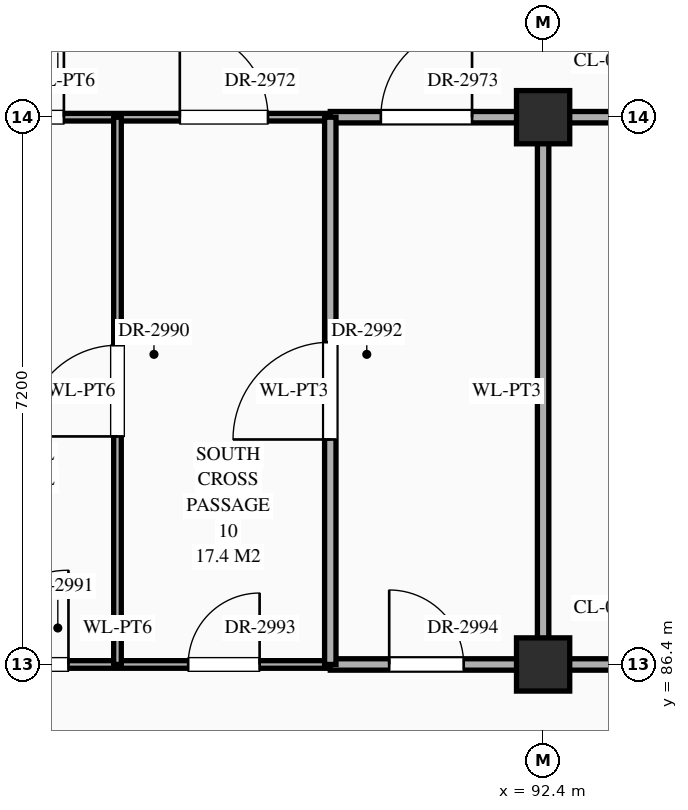
"""IFC4 building model, lengths in metres.
Left out: names, types, materials, properties, quantities, classifications, styles, units other than length and angle.
Written with IfcOpenShell. Run it as: python <this file> out.ifc"""

import sys

from ifc_helpers import new_model, si_unit, direction, frame, frame_2d, origin, origin_2d, place, context, subcontext, project, spatial, rectangle, extrude, element, fill, save


model = new_model("IFC4")
c1 = context("Model", 3, precision=1e-05, world=origin(), true_north=direction((0.0, 1.0)))
c2 = subcontext(c1, "Body", "Model", "MODEL_VIEW")
j1 = project(units=[si_unit("LENGTHUNIT", "METRE"), si_unit("PLANEANGLEUNIT", "RADIAN")], contexts=[c1])
p1 = place(None, origin())
s1 = spatial("IfcSite", under=j1, at=p1, CompositionType="ELEMENT")
p2 = place(p1, origin())
s2 = spatial("IfcBuilding", under=s1, at=p2, CompositionType="ELEMENT")
p3 = place(p2, frame((0.0, 0.0, 47.7)))
s3 = spatial("IfcBuildingStorey", under=s2, at=p3, CompositionType="ELEMENT", Elevation=47.7)
for number, where, z_axis, x_axis in (
    (1, (92.4, 86.4, 0.0), (0.0, 0.0, 1.0), (1.0, 0.0, 0.0)),
    (2, (92.4, 93.6, 0.0), (0.0, 0.0, 1.0), (1.0, 0.0, 0.0)),
):
    element("IfcColumn", number, at=place(p3, frame(where, z_axis=z_axis, x_axis=x_axis)), inside=s3, PredefinedType="COLUMN", context=c2, shape_type="SweptSolid", body=[
        extrude(rectangle(XDim=0.7, YDim=0.7, at=origin_2d()), origin(), (0.0, 0.0, 1.0), 4.2),
    ])
p4 = place(p3, frame((84.0, 86.4, 0.0), z_axis=(0.0, 0.0, 1.0), x_axis=(1.0, 0.0, 0.0)))
e3 = element("IfcWall", 3, at=p4, inside=s3, PredefinedType="STANDARD", context=c2, shape_type="SweptSolid", body=[
    extrude(rectangle(XDim=5.6, YDim=0.1, at=frame_2d((2.8, 0.0))), origin(), (0.0, 0.0, 1.0), 3.11),
])
p5 = place(p4, frame((0.915, 0.0, 0.0)))
e4 = element("IfcOpeningElement", 4, at=p5, cuts=e3, PredefinedType="OPENING", context=c2, shape_type="SweptSolid", body=[
    extrude(rectangle(XDim=1.24, YDim=2.3, at=frame_2d((0.62, 1.15))), frame((0.0, 0.062, 0.0), z_axis=(0.0, -1.0, 0.0), x_axis=(1.0, 0.0, 0.0)), (0.0, 0.0, 1.0), 0.124),
])
p6 = place(p4, frame((3.73, 0.0, 0.0)))
e5 = element("IfcOpeningElement", 5, at=p6, cuts=e3, PredefinedType="OPENING", context=c2, shape_type="SweptSolid", body=[
    extrude(rectangle(XDim=0.94, YDim=2.3, at=frame_2d((0.47, 1.15))), frame((0.0, 0.062, 0.0), z_axis=(0.0, -1.0, 0.0), x_axis=(1.0, 0.0, 0.0)), (0.0, 0.0, 1.0), 0.124),
])
p7 = place(p3, frame((89.6, 86.4, 0.0), z_axis=(0.0, 0.0, 1.0), x_axis=(1.0, 0.0, 0.0)))
e6 = element("IfcWall", 6, at=p7, inside=s3, PredefinedType="STANDARD", context=c2, shape_type="SweptSolid", body=[
    extrude(rectangle(XDim=11.2, YDim=0.15, at=frame_2d((5.6, 0.0))), origin(), (0.0, 0.0, 1.0), 3.11),
])
p8 = place(p7, frame((0.775, 0.0, 0.0)))
e7 = element("IfcOpeningElement", 7, at=p8, cuts=e6, PredefinedType="OPENING", context=c2, shape_type="SweptSolid", body=[
    extrude(rectangle(XDim=0.98, YDim=2.35, at=frame_2d((0.49, 1.175))), frame((0.0, 0.087, 0.0), z_axis=(0.0, -1.0, 0.0), x_axis=(1.0, 0.0, 0.0)), (0.0, 0.0, 1.0), 0.174),
])
p9 = place(p7, frame((6.49, 0.0, 0.0)))
e8 = element("IfcOpeningElement", 8, at=p9, cuts=e6, PredefinedType="OPENING", context=c2, shape_type="SweptSolid", body=[
    extrude(rectangle(XDim=1.02, YDim=2.4, at=frame_2d((0.51, 1.2))), frame((0.0, 0.087, 0.0), z_axis=(0.0, -1.0, 0.0), x_axis=(1.0, 0.0, 0.0)), (0.0, 0.0, 1.0), 0.174),
])
p10 = place(p3, frame((75.6, 93.6, 0.0), z_axis=(0.0, 0.0, 1.0), x_axis=(1.0, 0.0, 0.0)))
e9 = element("IfcWall", 9, at=p10, inside=s3, PredefinedType="STANDARD", context=c2, shape_type="SweptSolid", body=[
    extrude(rectangle(XDim=14.0, YDim=0.1, at=frame_2d((7.0, 0.0))), origin(), (0.0, 0.0, 1.0), 3.11),
])
p11 = place(p10, frame((3.425, 0.0, 0.0)))
e10 = element("IfcOpeningElement", 10, at=p11, cuts=e9, PredefinedType="OPENING", context=c2, shape_type="SweptSolid", body=[
    extrude(rectangle(XDim=1.55, YDim=2.35, at=frame_2d((0.775, 1.175))), frame((0.0, 0.062, 0.0), z_axis=(0.0, -1.0, 0.0), x_axis=(1.0, 0.0, 0.0)), (0.0, 0.0, 1.0), 0.124),
])
p12 = place(p10, frame((9.375, 0.0, 0.0)))
e11 = element("IfcOpeningElement", 11, at=p12, cuts=e9, PredefinedType="OPENING", context=c2, shape_type="SweptSolid", body=[
    extrude(rectangle(XDim=1.12, YDim=2.25, at=frame_2d((0.56, 1.125))), frame((0.0, 0.062, 0.0), z_axis=(0.0, -1.0, 0.0), x_axis=(1.0, 0.0, 0.0)), (0.0, 0.0, 1.0), 0.124),
])
p13 = place(p10, frame((12.02, 0.0, 0.0)))
e12 = element("IfcOpeningElement", 12, at=p13, cuts=e9, PredefinedType="OPENING", context=c2, shape_type="SweptSolid", body=[
    extrude(rectangle(XDim=1.16, YDim=2.3, at=frame_2d((0.58, 1.15))), frame((0.0, 0.062, 0.0), z_axis=(0.0, -1.0, 0.0), x_axis=(1.0, 0.0, 0.0)), (0.0, 0.0, 1.0), 0.124),
])
p14 = place(p3, frame((89.6, 93.6, 0.0), z_axis=(0.0, 0.0, 1.0), x_axis=(1.0, 0.0, 0.0)))
e13 = element("IfcWall", 13, at=p14, inside=s3, PredefinedType="STANDARD", context=c2, shape_type="SweptSolid", body=[
    extrude(rectangle(XDim=11.2, YDim=0.15, at=frame_2d((5.6, 0.0))), origin(), (0.0, 0.0, 1.0), 3.11),
])
p15 = place(p14, frame((0.665, 0.0, 0.0)))
e14 = element("IfcOpeningElement", 14, at=p15, cuts=e13, PredefinedType="OPENING", context=c2, shape_type="SweptSolid", body=[
    extrude(rectangle(XDim=1.2, YDim=2.35, at=frame_2d((0.6, 1.175))), frame((0.0, 0.087, 0.0), z_axis=(0.0, -1.0, 0.0), x_axis=(1.0, 0.0, 0.0)), (0.0, 0.0, 1.0), 0.174),
])
p16 = place(p14, frame((6.38, 0.0, 0.0)))
e15 = element("IfcOpeningElement", 15, at=p16, cuts=e13, PredefinedType="OPENING", context=c2, shape_type="SweptSolid", body=[
    extrude(rectangle(XDim=1.24, YDim=2.3, at=frame_2d((0.62, 1.15))), frame((0.0, 0.087, 0.0), z_axis=(0.0, -1.0, 0.0), x_axis=(1.0, 0.0, 0.0)), (0.0, 0.0, 1.0), 0.174),
])
p17 = place(p3, frame((86.8, 86.4, 0.0), z_axis=(0.0, 0.0, 1.0), x_axis=(0.0, 1.0, 0.0)))
e16 = element("IfcWall", 16, at=p17, inside=s3, PredefinedType="STANDARD", context=c2, shape_type="SweptSolid", body=[
    extrude(rectangle(XDim=7.2, YDim=0.1, at=frame_2d((3.6, 0.0))), origin(), (0.0, 0.0, 1.0), 3.96),
])
p18 = place(p17, frame((3.0, 0.0, 0.0)))
e17 = element("IfcOpeningElement", 17, at=p18, cuts=e16, PredefinedType="OPENING", context=c2, shape_type="SweptSolid", body=[
    extrude(rectangle(XDim=1.2, YDim=2.35, at=frame_2d((0.6, 1.175))), frame((0.0, 0.062, 0.0), z_axis=(0.0, -1.0, 0.0), x_axis=(1.0, 0.0, 0.0)), (0.0, 0.0, 1.0), 0.124),
])
p19 = place(p3, frame((89.6, 86.4, 0.0), z_axis=(0.0, 0.0, 1.0), x_axis=(0.0, 1.0, 0.0)))
e18 = element("IfcWall", 18, at=p19, inside=s3, PredefinedType="STANDARD", context=c2, shape_type="SweptSolid", body=[
    extrude(rectangle(XDim=7.2, YDim=0.15, at=frame_2d((3.6, 0.0))), origin(), (0.0, 0.0, 1.0), 3.96),
])
p20 = place(p19, frame((2.96, 0.0, 0.0)))
e19 = element("IfcOpeningElement", 19, at=p20, cuts=e18, PredefinedType="OPENING", context=c2, shape_type="SweptSolid", body=[
    extrude(rectangle(XDim=1.28, YDim=2.35, at=frame_2d((0.64, 1.175))), frame((0.0, 0.087, 0.0), z_axis=(0.0, -1.0, 0.0), x_axis=(1.0, 0.0, 0.0)), (0.0, 0.0, 1.0), 0.174),
])
p21 = place(p3, frame((92.4, 86.4, 0.0), z_axis=(0.0, 0.0, 1.0), x_axis=(0.0, 1.0, 0.0)))
e20 = element("IfcWall", 20, at=p21, inside=s3, PredefinedType="STANDARD", context=c2, shape_type="SweptSolid", body=[
    extrude(rectangle(XDim=7.2, YDim=0.15, at=frame_2d((3.6, 0.0))), origin(), (0.0, 0.0, 1.0), 3.21),
])
p22 = place(p12, origin())
e21 = element("IfcDoor", 21, at=p22, inside=s3, OperationType="SINGLE_SWING_RIGHT", PredefinedType="DOOR", context=c2, shape_type="SweptSolid", body=[
    extrude(rectangle(XDim=1.12, YDim=2.25, at=frame_2d((0.56, 1.125))), frame((0.0, 0.025, 0.0), z_axis=(0.0, -1.0, 0.0), x_axis=(1.0, 0.0, 0.0)), (0.0, 0.0, 1.0), 0.05),
])
fill(e11, e21)
p23 = place(p13, origin())
e22 = element("IfcDoor", 22, at=p23, inside=s3, OperationType="SINGLE_SWING_LEFT", PredefinedType="DOOR", context=c2, shape_type="SweptSolid", body=[
    extrude(rectangle(XDim=1.16, YDim=2.3, at=frame_2d((0.58, 1.15))), frame((0.0, 0.025, 0.0), z_axis=(0.0, -1.0, 0.0), x_axis=(1.0, 0.0, 0.0)), (0.0, 0.0, 1.0), 0.05),
])
fill(e12, e22)
p24 = place(p15, origin())
e23 = element("IfcDoor", 23, at=p24, inside=s3, OperationType="SINGLE_SWING_RIGHT", PredefinedType="DOOR", context=c2, shape_type="SweptSolid", body=[
    extrude(rectangle(XDim=1.2, YDim=2.35, at=frame_2d((0.6, 1.175))), frame((0.0, 0.025, 0.0), z_axis=(0.0, -1.0, 0.0), x_axis=(1.0, 0.0, 0.0)), (0.0, 0.0, 1.0), 0.05),
])
fill(e14, e23)
p25 = place(p18, origin())
e24 = element("IfcDoor", 24, at=p25, inside=s3, OperationType="SINGLE_SWING_LEFT", PredefinedType="DOOR", context=c2, shape_type="SweptSolid", body=[
    extrude(rectangle(XDim=1.2, YDim=2.35, at=frame_2d((0.6, 1.175))), frame((0.0, 0.025, 0.0), z_axis=(0.0, -1.0, 0.0), x_axis=(1.0, 0.0, 0.0)), (0.0, 0.0, 1.0), 0.05),
])
fill(e17, e24)
p26 = place(p5, origin())
e25 = element("IfcDoor", 25, at=p26, inside=s3, OperationType="SINGLE_SWING_RIGHT", PredefinedType="DOOR", context=c2, shape_type="SweptSolid", body=[
    extrude(rectangle(XDim=1.24, YDim=2.3, at=frame_2d((0.62, 1.15))), frame((0.0, 0.025, 0.0), z_axis=(0.0, -1.0, 0.0), x_axis=(1.0, 0.0, 0.0)), (0.0, 0.0, 1.0), 0.05),
])
fill(e4, e25)
p27 = place(p20, origin())
e26 = element("IfcDoor", 26, at=p27, inside=s3, OperationType="SINGLE_SWING_LEFT", PredefinedType="DOOR", context=c2, shape_type="SweptSolid", body=[
    extrude(rectangle(XDim=1.28, YDim=2.35, at=frame_2d((0.64, 1.175))), frame((0.0, 0.025, 0.0), z_axis=(0.0, -1.0, 0.0), x_axis=(1.0, 0.0, 0.0)), (0.0, 0.0, 1.0), 0.05),
])
fill(e19, e26)
p28 = place(p6, origin())
e27 = element("IfcDoor", 27, at=p28, inside=s3, OperationType="SINGLE_SWING_RIGHT", PredefinedType="DOOR", context=c2, shape_type="SweptSolid", body=[
    extrude(rectangle(XDim=0.94, YDim=2.3, at=frame_2d((0.47, 1.15))), frame((0.0, 0.025, 0.0), z_axis=(0.0, -1.0, 0.0), x_axis=(1.0, 0.0, 0.0)), (0.0, 0.0, 1.0), 0.05),
])
fill(e5, e27)
p29 = place(p8, origin())
e28 = element("IfcDoor", 28, at=p29, inside=s3, OperationType="SINGLE_SWING_LEFT", PredefinedType="DOOR", context=c2, shape_type="SweptSolid", body=[
    extrude(rectangle(XDim=0.98, YDim=2.35, at=frame_2d((0.49, 1.175))), frame((0.0, 0.025, 0.0), z_axis=(0.0, -1.0, 0.0), x_axis=(1.0, 0.0, 0.0)), (0.0, 0.0, 1.0), 0.05),
])
fill(e7, e28)
save(model, sys.argv[1])
